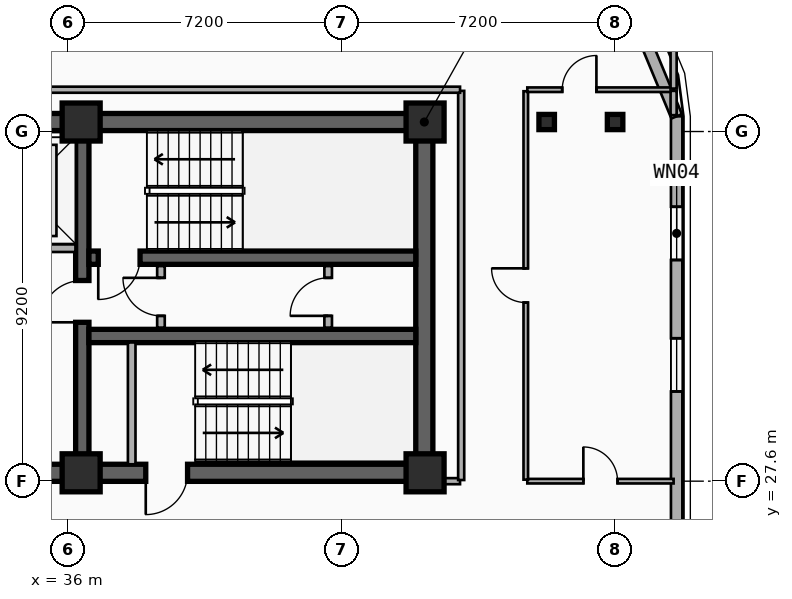
"""IFC4 building model, lengths in metres.
Left out: names, types, materials, properties, quantities, classifications, styles, units other than length and angle.
Written with IfcOpenShell. Run it as: python <this file> out.ifc"""

import sys

from ifc_helpers import new_model, si_unit, direction, frame, frame_2d, origin, origin_2d, place, context, subcontext, project, spatial, rectangle, i_section, extrude, element, fill, save


model = new_model("IFC4")
c1 = context("Model", 3, precision=1e-05, world=origin(), true_north=direction((0.0, 1.0)))
c2 = subcontext(c1, "Body", "Model", "MODEL_VIEW")
j1 = project(units=[si_unit("LENGTHUNIT", "METRE"), si_unit("PLANEANGLEUNIT", "RADIAN")], contexts=[c1])
p1 = place(None, origin())
s1 = spatial("IfcSite", under=j1, at=p1, CompositionType="ELEMENT")
p2 = place(p1, origin())
s2 = spatial("IfcBuilding", under=s1, at=p2, CompositionType="ELEMENT")
p3 = place(p2, frame((0.0, 0.0, 222.0)))
s3 = spatial("IfcBuildingStorey", under=s2, at=p3, CompositionType="ELEMENT", Elevation=222.0)
p4 = place(p3, frame((12.15, 37.05, 0.0), z_axis=(0.0, 0.0, 1.0), x_axis=(1.0, 0.0, 0.0)))
e1 = element("IfcWall", 1, at=p4, inside=s3, PredefinedType="SHEAR", context=c2, shape_type="SweptSolid", body=[
    extrude(rectangle(XDim=33.23, YDim=0.45, at=frame_2d((16.615, 0.0))), origin(), (0.0, 0.0, 1.0), 3.6),
])
p5 = place(p3, frame((45.38, 27.82, 0.0), z_axis=(0.0, 0.0, 1.0), x_axis=(-1.0, 0.0, 0.0)))
e2 = element("IfcWall", 2, at=p5, inside=s3, PredefinedType="SHEAR", context=c2, shape_type="SweptSolid", body=[
    extrude(rectangle(XDim=12.23, YDim=0.45, at=frame_2d((6.115, 0.0))), origin(), (0.0, 0.0, 1.0), 3.6),
])
p6 = place(p5, frame((9.93, 0.0, 0.0)))
e3 = element("IfcOpeningElement", 3, at=p6, cuts=e2, PredefinedType="OPENING", context=c2, shape_type="SweptSolid", body=[
    extrude(rectangle(XDim=1.1, YDim=2.15, at=frame_2d((0.55, 1.075))), frame((0.0, 0.235, 0.0), z_axis=(0.0, -1.0, 0.0), x_axis=(1.0, 0.0, 0.0)), (0.0, 0.0, 1.0), 0.47),
])
p7 = place(p5, frame((6.23, 0.0, 0.0)))
e4 = element("IfcOpeningElement", 4, at=p7, cuts=e2, PredefinedType="OPENING", context=c2, shape_type="SweptSolid", body=[
    extrude(rectangle(XDim=1.1, YDim=2.15, at=frame_2d((0.55, 1.075))), frame((0.0, 0.235, 0.0), z_axis=(0.0, -1.0, 0.0), x_axis=(1.0, 0.0, 0.0)), (0.0, 0.0, 1.0), 0.47),
])
p8 = place(p3, frame((45.38, 28.045, 0.0), z_axis=(0.0, 0.0, 1.0), x_axis=(0.0, 1.0, 0.0)))
e5 = element("IfcWall", 5, at=p8, inside=s3, PredefinedType="SHEAR", context=c2, shape_type="SweptSolid", body=[
    extrude(rectangle(XDim=8.78, YDim=0.45, at=frame_2d((4.39, 0.0))), origin(), (0.0, 0.0, 1.0), 3.6),
])
p9 = place(p3, frame((36.38, 28.045, 0.0), z_axis=(0.0, 0.0, 1.0), x_axis=(0.0, 1.0, 0.0)))
e6 = element("IfcWall", 6, at=p9, inside=s3, PredefinedType="SHEAR", context=c2, shape_type="SweptSolid", body=[
    extrude(rectangle(XDim=8.78, YDim=0.35, at=frame_2d((4.39, 0.0))), origin(), (0.0, 0.0, 1.0), 3.6),
])
p10 = place(p9, frame((3.735, 0.0, 0.0)))
e7 = element("IfcOpeningElement", 7, at=p10, cuts=e6, PredefinedType="OPENING", context=c2, shape_type="SweptSolid", body=[
    extrude(rectangle(XDim=1.1, YDim=2.15, at=frame_2d((0.55, 1.075))), frame((0.0, 0.185, 0.0), z_axis=(0.0, -1.0, 0.0), x_axis=(1.0, 0.0, 0.0)), (0.0, 0.0, 1.0), 0.37),
])
p11 = place(p3, frame((45.155, 33.48, 0.0), z_axis=(0.0, 0.0, 1.0), x_axis=(-1.0, 0.0, 0.0)))
e8 = element("IfcWall", 8, at=p11, inside=s3, PredefinedType="SHEAR", context=c2, shape_type="SweptSolid", body=[
    extrude(rectangle(XDim=8.6, YDim=0.35, at=frame_2d((4.3, 0.0))), origin(), (0.0, 0.0, 1.0), 3.6),
])
p12 = place(p11, frame((7.255, 0.0, 0.0)))
e9 = element("IfcOpeningElement", 9, at=p12, cuts=e8, PredefinedType="OPENING", context=c2, shape_type="SweptSolid", body=[
    extrude(rectangle(XDim=1.1, YDim=2.15, at=frame_2d((0.55, 1.075))), frame((0.0, 0.185, 0.0), z_axis=(0.0, -1.0, 0.0), x_axis=(1.0, 0.0, 0.0)), (0.0, 0.0, 1.0), 0.37),
])
p13 = place(p3, frame((36.555, 31.42, 0.0), z_axis=(0.0, 0.0, 1.0), x_axis=(1.0, 0.0, 0.0)))
e10 = element("IfcWall", 10, at=p13, inside=s3, PredefinedType="SHEAR", context=c2, shape_type="SweptSolid", body=[
    extrude(rectangle(XDim=8.6, YDim=0.35, at=frame_2d((4.3, 0.0))), origin(), (0.0, 0.0, 1.0), 3.6),
])
for number, where, z_axis, x_axis in (
    (11, (36.35, 27.82, 0.0), (0.0, 0.0, 1.0), (1.0, 0.0, 0.0)),
    (12, (36.35, 37.05, 0.0), (0.0, 0.0, 1.0), (1.0, 0.0, 0.0)),
    (13, (45.4, 27.82, 0.0), (0.0, 0.0, 1.0), (1.0, 0.0, 0.0)),
    (14, (45.4, 37.05, 0.0), (0.0, 0.0, 1.0), (1.0, 0.0, 0.0)),
):
    element("IfcColumn", number, at=place(p3, frame(where, z_axis=z_axis, x_axis=x_axis)), inside=s3, PredefinedType="COLUMN", context=c2, shape_type="SweptSolid", body=[
        extrude(rectangle(XDim=1.0, YDim=1.0, at=origin_2d()), origin(), (0.0, 0.0, 1.0), 3.6),
    ])
for number, where, z_axis, x_axis in (
    (15, (48.6, 37.05, 0.0), (0.0, 0.0, 1.0), (1.0, 0.0, 0.0)),
    (16, (50.4, 37.05, 0.0), (0.0, 0.0, 1.0), (1.0, 0.0, 0.0)),
):
    element("IfcColumn", number, at=place(p3, frame(where, z_axis=z_axis, x_axis=x_axis)), inside=s3, PredefinedType="COLUMN", context=c2, shape_type="SweptSolid", body=[
        extrude(i_section(OverallWidth=0.408, OverallDepth=0.4, WebThickness=0.025, FlangeThickness=0.039, FilletRadius=0.015, at=origin_2d()), origin(), (0.0, 0.0, 1.0), 3.6),
    ])
p14 = place(p3, frame((52.02, 37.2, 0.0), z_axis=(0.0, 0.0, 1.0), x_axis=(0.0, -1.0, 0.0)))
e17 = element("IfcWall", 17, at=p14, inside=s3, PredefinedType="SOLIDWALL", context=c2, shape_type="SweptSolid", body=[
    extrude(rectangle(XDim=28.6, YDim=0.3, at=frame_2d((14.3, 0.0))), origin(), (0.0, 0.0, 1.0), 3.34),
])
p15 = place(p14, frame((2.38, 0.0, 0.34)))
e18 = element("IfcOpeningElement", 18, at=p15, cuts=e17, PredefinedType="OPENING", context=c2, shape_type="SweptSolid", body=[
    extrude(rectangle(XDim=1.4, YDim=2.1, at=frame_2d((0.7, 1.05))), frame((0.0, 0.16, 0.0), z_axis=(0.0, -1.0, 0.0), x_axis=(1.0, 0.0, 0.0)), (0.0, 0.0, 1.0), 0.32),
])
p16 = place(p14, frame((5.84, 0.0, 0.34)))
e19 = element("IfcOpeningElement", 19, at=p16, cuts=e17, PredefinedType="OPENING", context=c2, shape_type="SweptSolid", body=[
    extrude(rectangle(XDim=1.4, YDim=2.1, at=frame_2d((0.7, 1.05))), frame((0.0, 0.16, 0.0), z_axis=(0.0, -1.0, 0.0), x_axis=(1.0, 0.0, 0.0)), (0.0, 0.0, 1.0), 0.32),
])
p17 = place(p14, frame((16.527, 0.0, 0.34)))
e20 = element("IfcOpeningElement", 20, at=p17, cuts=e17, PredefinedType="OPENING", context=c2, shape_type="SweptSolid", body=[
    extrude(rectangle(XDim=1.4, YDim=2.1, at=frame_2d((0.7, 1.05))), frame((0.0, 0.16, 0.0), z_axis=(0.0, -1.0, 0.0), x_axis=(1.0, 0.0, 0.0)), (0.0, 0.0, 1.0), 0.32),
])
p18 = place(p14, frame((22.403, 0.0, 0.34)))
e21 = element("IfcOpeningElement", 21, at=p18, cuts=e17, PredefinedType="OPENING", context=c2, shape_type="SweptSolid", body=[
    extrude(rectangle(XDim=1.4, YDim=2.1, at=frame_2d((0.7, 1.05))), frame((0.0, 0.16, 0.0), z_axis=(0.0, -1.0, 0.0), x_axis=(1.0, 0.0, 0.0)), (0.0, 0.0, 1.0), 0.32),
])
p19 = place(p3, frame((50.843, 40.042, 0.0), z_axis=(0.0, 0.0, 1.0), x_axis=(0.382704529509, -0.923870793506, 0.0)))
e22 = element("IfcWall", 22, at=p19, inside=s3, PredefinedType="SOLIDWALL", context=c2, shape_type="SweptSolid", body=[
    extrude(rectangle(XDim=3.077, YDim=0.3, at=frame_2d((1.538, 0.0))), origin(), (0.0, 0.0, 1.0), 3.34),
])
p20 = place(p3, frame((33.475, 33.73, 0.0), z_axis=(0.0, 0.0, 1.0), x_axis=(1.0, 0.0, 0.0)))
e23 = element("IfcWall", 23, at=p20, inside=s3, PredefinedType="PARTITIONING", context=c2, shape_type="SweptSolid", body=[
    extrude(rectangle(XDim=2.725, YDim=0.2, at=frame_2d((1.362, 0.0))), origin(), (0.0, 0.0, 1.0), 2.41),
])
p21 = place(p20, frame((0.812, 0.0, 0.0)))
e24 = element("IfcOpeningElement", 24, at=p21, cuts=e23, PredefinedType="OPENING", context=c2, shape_type="SweptSolid", body=[
    extrude(rectangle(XDim=1.1, YDim=2.15, at=frame_2d((0.55, 1.075))), frame((0.0, 0.11, 0.0), z_axis=(0.0, -1.0, 0.0), x_axis=(1.0, 0.0, 0.0)), (0.0, 0.0, 1.0), 0.22),
])
p22 = place(p3, frame((37.68, 28.045, 0.0), z_axis=(0.0, 0.0, 1.0), x_axis=(0.0, 1.0, 0.0)))
e25 = element("IfcWall", 25, at=p22, inside=s3, PredefinedType="PARTITIONING", context=c2, shape_type="SweptSolid", body=[
    extrude(rectangle(XDim=3.205, YDim=0.2, at=frame_2d((1.603, 0.0))), origin(), (0.0, 0.0, 1.0), 2.72),
])
p23 = place(p3, frame((38.45, 31.64, 0.0), z_axis=(0.0, 0.0, 1.0), x_axis=(0.0, 1.0, 0.0)))
e26 = element("IfcWall", 26, at=p23, inside=s3, PredefinedType="PARTITIONING", context=c2, shape_type="SweptSolid", body=[
    extrude(rectangle(XDim=1.62, YDim=0.2, at=frame_2d((0.81, 0.0))), origin(), (0.0, 0.0, 1.0), 3.34),
])
p24 = place(p23, frame((0.31, 0.0, 0.0)))
e27 = element("IfcOpeningElement", 27, at=p24, cuts=e26, PredefinedType="OPENING", context=c2, shape_type="SweptSolid", body=[
    extrude(rectangle(XDim=1.0, YDim=2.15, at=frame_2d((0.5, 1.075))), frame((0.0, 0.11, 0.0), z_axis=(0.0, -1.0, 0.0), x_axis=(1.0, 0.0, 0.0)), (0.0, 0.0, 1.0), 0.22),
])
p25 = place(p3, frame((42.85, 31.64, 0.0), z_axis=(0.0, 0.0, 1.0), x_axis=(0.0, 1.0, 0.0)))
e28 = element("IfcWall", 28, at=p25, inside=s3, PredefinedType="PARTITIONING", context=c2, shape_type="SweptSolid", body=[
    extrude(rectangle(XDim=1.62, YDim=0.2, at=frame_2d((0.81, 0.0))), origin(), (0.0, 0.0, 1.0), 3.34),
])
p26 = place(p25, frame((0.31, 0.0, 0.0)))
e29 = element("IfcOpeningElement", 29, at=p26, cuts=e28, PredefinedType="OPENING", context=c2, shape_type="SweptSolid", body=[
    extrude(rectangle(XDim=1.0, YDim=2.15, at=frame_2d((0.5, 1.075))), frame((0.0, 0.11, 0.0), z_axis=(0.0, -1.0, 0.0), x_axis=(1.0, 0.0, 0.0)), (0.0, 0.0, 1.0), 0.22),
])
p27 = place(p3, frame((48.09, 27.6, 0.0), z_axis=(0.0, 0.0, 1.0), x_axis=(1.0, 0.0, 0.0)))
e30 = element("IfcWall", 30, at=p27, inside=s3, PredefinedType="PARTITIONING", context=c2, shape_type="SweptSolid", body=[
    extrude(rectangle(XDim=3.85, YDim=0.12, at=frame_2d((1.925, 0.0))), origin(), (0.0, 0.0, 1.0), 2.67),
])
p28 = place(p27, frame((1.475, 0.0, 0.0)))
e31 = element("IfcOpeningElement", 31, at=p28, cuts=e30, PredefinedType="OPENING", context=c2, shape_type="SweptSolid", body=[
    extrude(rectangle(XDim=0.9, YDim=2.1, at=frame_2d((0.45, 1.05))), frame((0.0, 0.07, 0.0), z_axis=(0.0, -1.0, 0.0), x_axis=(1.0, 0.0, 0.0)), (0.0, 0.0, 1.0), 0.14),
])
p29 = place(p3, frame((48.05, 27.64, 0.0), z_axis=(0.0, 0.0, 1.0), x_axis=(0.0, 1.0, 0.0)))
e32 = element("IfcWall", 32, at=p29, inside=s3, PredefinedType="PARTITIONING", context=c2, shape_type="SweptSolid", body=[
    extrude(rectangle(XDim=10.22, YDim=0.12, at=frame_2d((5.11, 0.0))), origin(), (0.0, 0.0, 1.0), 2.82),
])
p30 = place(p29, frame((4.66, 0.0, 0.0)))
e33 = element("IfcOpeningElement", 33, at=p30, cuts=e32, PredefinedType="OPENING", context=c2, shape_type="SweptSolid", body=[
    extrude(rectangle(XDim=0.9, YDim=2.1, at=frame_2d((0.45, 1.05))), frame((0.0, 0.07, 0.0), z_axis=(0.0, -1.0, 0.0), x_axis=(1.0, 0.0, 0.0)), (0.0, 0.0, 1.0), 0.14),
])
p31 = place(p3, frame((48.09, 37.9, 0.0), z_axis=(0.0, 0.0, 1.0), x_axis=(1.0, 0.0, 0.0)))
e34 = element("IfcWall", 34, at=p31, inside=s3, PredefinedType="PARTITIONING", context=c2, shape_type="SweptSolid", body=[
    extrude(rectangle(XDim=3.85, YDim=0.12, at=frame_2d((1.925, 0.0))), origin(), (0.0, 0.0, 1.0), 3.34),
])
p32 = place(p31, frame((0.919, 0.0, 0.0)))
e35 = element("IfcOpeningElement", 35, at=p32, cuts=e34, PredefinedType="OPENING", context=c2, shape_type="SweptSolid", body=[
    extrude(rectangle(XDim=0.9, YDim=2.1, at=frame_2d((0.45, 1.05))), frame((0.0, 0.07, 0.0), z_axis=(0.0, -1.0, 0.0), x_axis=(1.0, 0.0, 0.0)), (0.0, 0.0, 1.0), 0.14),
])
p33 = place(p3, frame((45.41, 27.6, 0.0), z_axis=(0.0, 0.0, 1.0), x_axis=(1.0, 0.0, 0.0)))
e36 = element("IfcWall", 36, at=p33, inside=s3, PredefinedType="PARTITIONING", context=c2, shape_type="SweptSolid", body=[
    extrude(rectangle(XDim=0.91, YDim=0.16, at=frame_2d((0.455, 0.0))), origin(), (0.0, 0.0, 1.0), 2.41),
])
p34 = place(p3, frame((46.35, 27.63, 0.0), z_axis=(0.0, 0.0, 1.0), x_axis=(0.0, 1.0, 0.0)))
e37 = element("IfcWall", 37, at=p34, inside=s3, PredefinedType="PARTITIONING", context=c2, shape_type="SweptSolid", body=[
    extrude(rectangle(XDim=10.24, YDim=0.16, at=frame_2d((5.12, 0.0))), origin(), (0.0, 0.0, 1.0), 2.82),
])
p35 = place(p3, frame((11.28, 37.9, 0.0), z_axis=(0.0, 0.0, 1.0), x_axis=(1.0, 0.0, 0.0)))
e38 = element("IfcWall", 38, at=p35, inside=s3, PredefinedType="PARTITIONING", context=c2, shape_type="SweptSolid", body=[
    extrude(rectangle(XDim=35.04, YDim=0.16, at=frame_2d((17.52, 0.0))), origin(), (0.0, 0.0, 1.0), 3.34),
])
p36 = place(p3, frame((51.94, 37.93, 0.0), z_axis=(0.0, 0.0, 1.0), x_axis=(0.0, 1.0, 0.0)))
e39 = element("IfcWall", 39, at=p36, inside=s3, PredefinedType="PARTITIONING", context=c2, shape_type="SweptSolid", body=[
    extrude(rectangle(XDim=1.44, YDim=0.16, at=frame_2d((0.72, 0.0))), origin(), (0.0, 0.0, 1.0), 3.34),
])
p37 = place(p3, frame((51.94, 37.23, 0.0), z_axis=(0.0, 0.0, 1.0), x_axis=(0.0, 1.0, 0.0)))
e40 = element("IfcWall", 40, at=p37, inside=s3, PredefinedType="PARTITIONING", context=c2, shape_type="SweptSolid", body=[
    extrude(rectangle(XDim=0.64, YDim=0.16, at=frame_2d((0.32, 0.0))), origin(), (0.0, 0.0, 1.0), 3.34),
])
p38 = place(p15, origin())
e41 = element("IfcWindow", 41, at=p38, inside=s3, PartitioningType="SINGLE_PANEL", PredefinedType="WINDOW", context=c2, shape_type="SweptSolid", body=[
    extrude(rectangle(XDim=1.4, YDim=2.1, at=frame_2d((0.7, 1.05))), frame((0.0, 0.03, 0.0), z_axis=(0.0, -1.0, 0.0), x_axis=(1.0, 0.0, 0.0)), (0.0, 0.0, 1.0), 0.06),
])
fill(e18, e41)
p39 = place(p16, origin())
e42 = element("IfcWindow", 42, at=p39, inside=s3, PartitioningType="SINGLE_PANEL", PredefinedType="WINDOW", context=c2, shape_type="SweptSolid", body=[
    extrude(rectangle(XDim=1.4, YDim=2.1, at=frame_2d((0.7, 1.05))), frame((0.0, 0.03, 0.0), z_axis=(0.0, -1.0, 0.0), x_axis=(1.0, 0.0, 0.0)), (0.0, 0.0, 1.0), 0.06),
])
fill(e19, e42)
p40 = place(p12, origin())
e43 = element("IfcDoor", 43, at=p40, inside=s3, OperationType="SINGLE_SWING_RIGHT", PredefinedType="DOOR", context=c2, shape_type="SweptSolid", body=[
    extrude(rectangle(XDim=1.1, YDim=2.15, at=frame_2d((0.55, 1.075))), frame((0.0, 0.025, 0.0), z_axis=(0.0, -1.0, 0.0), x_axis=(1.0, 0.0, 0.0)), (0.0, 0.0, 1.0), 0.05),
])
fill(e9, e43)
p41 = place(p10, origin())
e44 = element("IfcDoor", 44, at=p41, inside=s3, OperationType="SINGLE_SWING_LEFT", PredefinedType="DOOR", context=c2, shape_type="SweptSolid", body=[
    extrude(rectangle(XDim=1.1, YDim=2.15, at=frame_2d((0.55, 1.075))), frame((0.0, 0.025, 0.0), z_axis=(0.0, -1.0, 0.0), x_axis=(1.0, 0.0, 0.0)), (0.0, 0.0, 1.0), 0.05),
])
fill(e7, e44)
p42 = place(p7, origin())
e45 = element("IfcDoor", 45, at=p42, inside=s3, OperationType="SINGLE_SWING_RIGHT", PredefinedType="DOOR", context=c2, shape_type="SweptSolid", body=[
    extrude(rectangle(XDim=1.1, YDim=2.15, at=frame_2d((0.55, 1.075))), frame((0.0, 0.025, 0.0), z_axis=(0.0, -1.0, 0.0), x_axis=(1.0, 0.0, 0.0)), (0.0, 0.0, 1.0), 0.05),
])
fill(e4, e45)
p43 = place(p24, origin())
e46 = element("IfcDoor", 46, at=p43, inside=s3, OperationType="SINGLE_SWING_RIGHT", PredefinedType="DOOR", context=c2, shape_type="SweptSolid", body=[
    extrude(rectangle(XDim=1.0, YDim=2.15, at=frame_2d((0.5, 1.075))), frame((0.0, 0.025, 0.0), z_axis=(0.0, -1.0, 0.0), x_axis=(1.0, 0.0, 0.0)), (0.0, 0.0, 1.0), 0.05),
])
fill(e27, e46)
p44 = place(p26, origin())
e47 = element("IfcDoor", 47, at=p44, inside=s3, OperationType="SINGLE_SWING_LEFT", PredefinedType="DOOR", context=c2, shape_type="SweptSolid", body=[
    extrude(rectangle(XDim=1.0, YDim=2.15, at=frame_2d((0.5, 1.075))), frame((0.0, 0.025, 0.0), z_axis=(0.0, -1.0, 0.0), x_axis=(1.0, 0.0, 0.0)), (0.0, 0.0, 1.0), 0.05),
])
fill(e29, e47)
p45 = place(p28, origin())
e48 = element("IfcDoor", 48, at=p45, inside=s3, OperationType="SINGLE_SWING_LEFT", PredefinedType="DOOR", context=c2, shape_type="SweptSolid", body=[
    extrude(rectangle(XDim=0.9, YDim=2.1, at=frame_2d((0.45, 1.05))), frame((0.0, 0.025, 0.0), z_axis=(0.0, -1.0, 0.0), x_axis=(1.0, 0.0, 0.0)), (0.0, 0.0, 1.0), 0.05),
])
fill(e31, e48)
p46 = place(p30, origin())
e49 = element("IfcDoor", 49, at=p46, inside=s3, OperationType="SINGLE_SWING_RIGHT", PredefinedType="DOOR", context=c2, shape_type="SweptSolid", body=[
    extrude(rectangle(XDim=0.9, YDim=2.1, at=frame_2d((0.45, 1.05))), frame((0.0, 0.025, 0.0), z_axis=(0.0, -1.0, 0.0), x_axis=(1.0, 0.0, 0.0)), (0.0, 0.0, 1.0), 0.05),
])
fill(e33, e49)
p47 = place(p32, origin())
e50 = element("IfcDoor", 50, at=p47, inside=s3, OperationType="SINGLE_SWING_RIGHT", PredefinedType="DOOR", context=c2, shape_type="SweptSolid", body=[
    extrude(rectangle(XDim=0.9, YDim=2.1, at=frame_2d((0.45, 1.05))), frame((0.0, 0.025, 0.0), z_axis=(0.0, -1.0, 0.0), x_axis=(1.0, 0.0, 0.0)), (0.0, 0.0, 1.0), 0.05),
])
fill(e35, e50)
save(model, sys.argv[1])
